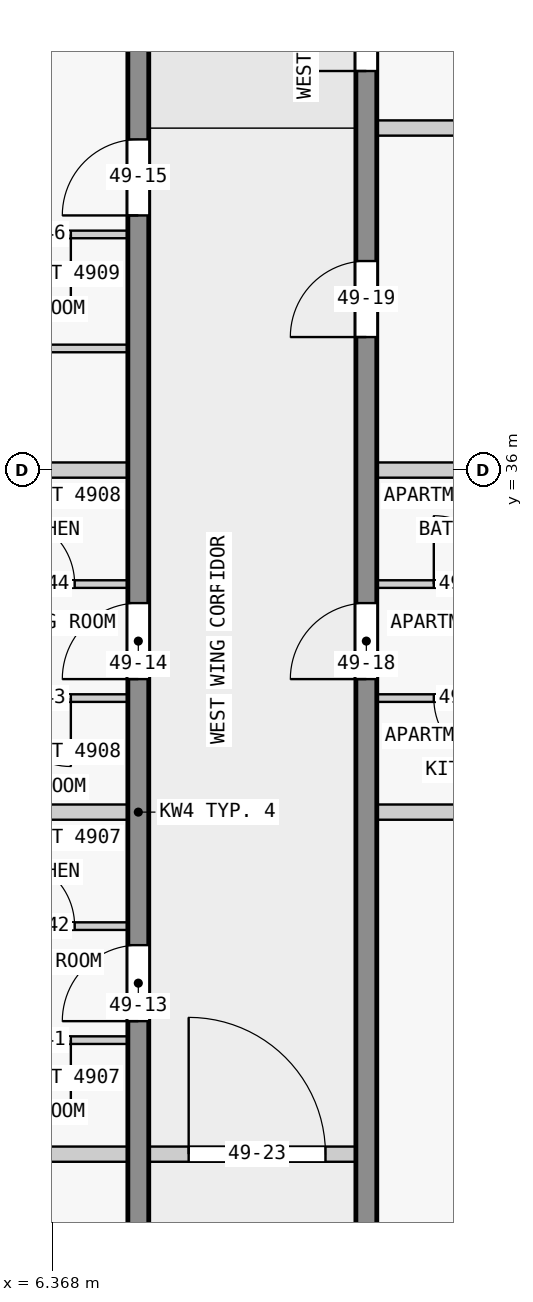
"""IFC4 building model, lengths in metres.
Left out: names, types, materials, properties, quantities, classifications, styles, units other than length and angle.
Written with IfcOpenShell. Run it as: python <this file> out.ifc"""

import sys

from ifc_helpers import new_model, si_unit, direction, frame, frame_2d, origin, place, context, subcontext, project, spatial, rectangle, extrude, element, fill, save


model = new_model("IFC4")
c1 = context("Model", 3, precision=1e-05, world=origin(), true_north=direction((0.0, 1.0)))
c2 = subcontext(c1, "Body", "Model", "MODEL_VIEW")
j1 = project(units=[si_unit("LENGTHUNIT", "METRE"), si_unit("PLANEANGLEUNIT", "RADIAN")], contexts=[c1])
p1 = place(None, origin())
s1 = spatial("IfcSite", under=j1, at=p1, CompositionType="ELEMENT")
p2 = place(p1, origin())
s2 = spatial("IfcBuilding", under=s1, at=p2, CompositionType="ELEMENT")
p3 = place(p2, frame((0.0, 0.0, 190.9)))
s3 = spatial("IfcBuildingStorey", under=s2, at=p3, CompositionType="ELEMENT", Elevation=190.9)
p4 = place(p3, frame((7.5, 18.0, 0.0), z_axis=(0.0, 0.0, 1.0), x_axis=(0.0, 1.0, 0.0)))
e1 = element("IfcWall", 1, at=p4, inside=s3, PredefinedType="SHEAR", context=c2, shape_type="SweptSolid", body=[
    extrude(rectangle(XDim=27.0, YDim=0.275, at=frame_2d((13.5, 0.0))), origin(), (0.0, 0.0, 1.0), 3.25),
])
p5 = place(p4, frame((1.75, 0.0, 0.0)))
e2 = element("IfcOpeningElement", 2, at=p5, cuts=e1, PredefinedType="OPENING", context=c2, shape_type="SweptSolid", body=[
    extrude(rectangle(XDim=1.0, YDim=2.1, at=frame_2d((0.5, 1.05))), frame((0.0, 0.147, 0.0), z_axis=(0.0, -1.0, 0.0), x_axis=(1.0, 0.0, 0.0)), (0.0, 0.0, 1.0), 0.295),
])
p6 = place(p4, frame((5.85, 0.0, 0.0)))
e3 = element("IfcOpeningElement", 3, at=p6, cuts=e1, PredefinedType="OPENING", context=c2, shape_type="SweptSolid", body=[
    extrude(rectangle(XDim=1.8, YDim=2.1, at=frame_2d((0.9, 1.05))), frame((0.0, 0.147, 0.0), z_axis=(0.0, -1.0, 0.0), x_axis=(1.0, 0.0, 0.0)), (0.0, 0.0, 1.0), 0.295),
])
p7 = place(p4, frame((10.75, 0.0, 0.0)))
e4 = element("IfcOpeningElement", 4, at=p7, cuts=e1, PredefinedType="OPENING", context=c2, shape_type="SweptSolid", body=[
    extrude(rectangle(XDim=1.0, YDim=2.1, at=frame_2d((0.5, 1.05))), frame((0.0, 0.147, 0.0), z_axis=(0.0, -1.0, 0.0), x_axis=(1.0, 0.0, 0.0)), (0.0, 0.0, 1.0), 0.295),
])
p8 = place(p4, frame((15.25, 0.0, 0.0)))
e5 = element("IfcOpeningElement", 5, at=p8, cuts=e1, PredefinedType="OPENING", context=c2, shape_type="SweptSolid", body=[
    extrude(rectangle(XDim=1.0, YDim=2.1, at=frame_2d((0.5, 1.05))), frame((0.0, 0.147, 0.0), z_axis=(0.0, -1.0, 0.0), x_axis=(1.0, 0.0, 0.0)), (0.0, 0.0, 1.0), 0.295),
])
p9 = place(p4, frame((21.35, 0.0, 0.0)))
e6 = element("IfcOpeningElement", 6, at=p9, cuts=e1, PredefinedType="OPENING", context=c2, shape_type="SweptSolid", body=[
    extrude(rectangle(XDim=1.0, YDim=2.1, at=frame_2d((0.5, 1.05))), frame((0.0, 0.147, 0.0), z_axis=(0.0, -1.0, 0.0), x_axis=(1.0, 0.0, 0.0)), (0.0, 0.0, 1.0), 0.295),
])
p10 = place(p3, frame((10.5, 18.0, 0.0), z_axis=(0.0, 0.0, 1.0), x_axis=(0.0, 1.0, 0.0)))
e7 = element("IfcWall", 7, at=p10, inside=s3, PredefinedType="SHEAR", context=c2, shape_type="SweptSolid", body=[
    extrude(rectangle(XDim=27.0, YDim=0.275, at=frame_2d((13.5, 0.0))), origin(), (0.0, 0.0, 1.0), 3.25),
])
p11 = place(p10, frame((1.75, 0.0, 0.0)))
e8 = element("IfcOpeningElement", 8, at=p11, cuts=e7, PredefinedType="OPENING", context=c2, shape_type="SweptSolid", body=[
    extrude(rectangle(XDim=1.0, YDim=2.1, at=frame_2d((0.5, 1.05))), frame((0.0, 0.147, 0.0), z_axis=(0.0, -1.0, 0.0), x_axis=(1.0, 0.0, 0.0)), (0.0, 0.0, 1.0), 0.295),
])
p12 = place(p10, frame((6.25, 0.0, 0.0)))
e9 = element("IfcOpeningElement", 9, at=p12, cuts=e7, PredefinedType="OPENING", context=c2, shape_type="SweptSolid", body=[
    extrude(rectangle(XDim=1.0, YDim=2.1, at=frame_2d((0.5, 1.05))), frame((0.0, 0.147, 0.0), z_axis=(0.0, -1.0, 0.0), x_axis=(1.0, 0.0, 0.0)), (0.0, 0.0, 1.0), 0.295),
])
p13 = place(p10, frame((15.25, 0.0, 0.0)))
e10 = element("IfcOpeningElement", 10, at=p13, cuts=e7, PredefinedType="OPENING", context=c2, shape_type="SweptSolid", body=[
    extrude(rectangle(XDim=1.0, YDim=2.1, at=frame_2d((0.5, 1.05))), frame((0.0, 0.147, 0.0), z_axis=(0.0, -1.0, 0.0), x_axis=(1.0, 0.0, 0.0)), (0.0, 0.0, 1.0), 0.295),
])
p14 = place(p10, frame((19.75, 0.0, 0.0)))
e11 = element("IfcOpeningElement", 11, at=p14, cuts=e7, PredefinedType="OPENING", context=c2, shape_type="SweptSolid", body=[
    extrude(rectangle(XDim=1.0, YDim=2.1, at=frame_2d((0.5, 1.05))), frame((0.0, 0.147, 0.0), z_axis=(0.0, -1.0, 0.0), x_axis=(1.0, 0.0, 0.0)), (0.0, 0.0, 1.0), 0.295),
])
p15 = place(p10, frame((23.25, 0.0, 0.0)))
e12 = element("IfcOpeningElement", 12, at=p15, cuts=e7, PredefinedType="OPENING", context=c2, shape_type="SweptSolid", body=[
    extrude(rectangle(XDim=0.9, YDim=2.1, at=frame_2d((0.45, 1.05))), frame((0.0, 0.147, 0.0), z_axis=(0.0, -1.0, 0.0), x_axis=(1.0, 0.0, 0.0)), (0.0, 0.0, 1.0), 0.295),
])
p16 = place(p10, frame((25.45, 0.0, 0.0)))
e13 = element("IfcOpeningElement", 13, at=p16, cuts=e7, PredefinedType="OPENING", context=c2, shape_type="SweptSolid", body=[
    extrude(rectangle(XDim=1.0, YDim=2.1, at=frame_2d((0.5, 1.05))), frame((0.0, 0.147, 0.0), z_axis=(0.0, -1.0, 0.0), x_axis=(1.0, 0.0, 0.0)), (0.0, 0.0, 1.0), 0.295),
])
p17 = place(p3, frame((7.363, 27.0, 0.0), z_axis=(0.0, 0.0, 1.0), x_axis=(-1.0, 0.0, 0.0)))
e14 = element("IfcWall", 14, at=p17, inside=s3, PredefinedType="PARTITIONING", context=c2, shape_type="SweptSolid", body=[
    extrude(rectangle(XDim=7.443, YDim=0.2, at=frame_2d((3.721, 0.0))), origin(), (0.0, 0.0, 1.0), 3.25),
])
p18 = place(p3, frame((7.363, 28.5, 0.0), z_axis=(0.0, 0.0, 1.0), x_axis=(-1.0, 0.0, 0.0)))
e15 = element("IfcWall", 15, at=p18, inside=s3, PredefinedType="PARTITIONING", context=c2, shape_type="SweptSolid", body=[
    extrude(rectangle(XDim=2.4, YDim=0.1, at=frame_2d((1.2, 0.0))), origin(), (0.0, 0.0, 1.0), 3.25),
])
p19 = place(p18, frame((0.75, 0.0, 0.0)))
e16 = element("IfcOpeningElement", 16, at=p19, cuts=e15, PredefinedType="OPENING", context=c2, shape_type="SweptSolid", body=[
    extrude(rectangle(XDim=0.9, YDim=2.1, at=frame_2d((0.45, 1.05))), frame((0.0, 0.06, 0.0), z_axis=(0.0, -1.0, 0.0), x_axis=(1.0, 0.0, 0.0)), (0.0, 0.0, 1.0), 0.12),
])
p20 = place(p3, frame((5.012, 30.0, 0.0), z_axis=(0.0, 0.0, 1.0), x_axis=(1.0, 0.0, 0.0)))
e17 = element("IfcWall", 17, at=p20, inside=s3, PredefinedType="PARTITIONING", context=c2, shape_type="SweptSolid", body=[
    extrude(rectangle(XDim=2.35, YDim=0.1, at=frame_2d((1.175, 0.0))), origin(), (0.0, 0.0, 1.0), 3.25),
])
p21 = place(p20, frame((0.75, 0.0, 0.0)))
e18 = element("IfcOpeningElement", 18, at=p21, cuts=e17, PredefinedType="OPENING", context=c2, shape_type="SweptSolid", body=[
    extrude(rectangle(XDim=0.9, YDim=2.1, at=frame_2d((0.45, 1.05))), frame((0.0, 0.06, 0.0), z_axis=(0.0, -1.0, 0.0), x_axis=(1.0, 0.0, 0.0)), (0.0, 0.0, 1.0), 0.12),
])
p22 = place(p3, frame((7.363, 31.5, 0.0), z_axis=(0.0, 0.0, 1.0), x_axis=(-1.0, 0.0, 0.0)))
e19 = element("IfcWall", 19, at=p22, inside=s3, PredefinedType="PARTITIONING", context=c2, shape_type="SweptSolid", body=[
    extrude(rectangle(XDim=2.3, YDim=0.2, at=frame_2d((1.15, 0.0))), origin(), (0.0, 0.0, 1.0), 3.25),
])
p23 = place(p3, frame((17.85, 31.5, 0.0), z_axis=(0.0, 0.0, 1.0), x_axis=(-1.0, 0.0, 0.0)))
e20 = element("IfcWall", 20, at=p23, inside=s3, PredefinedType="PARTITIONING", context=c2, shape_type="SweptSolid", body=[
    extrude(rectangle(XDim=7.213, YDim=0.2, at=frame_2d((3.606, 0.0))), origin(), (0.0, 0.0, 1.0), 3.25),
])
p24 = place(p3, frame((7.363, 33.0, 0.0), z_axis=(0.0, 0.0, 1.0), x_axis=(-1.0, 0.0, 0.0)))
e21 = element("IfcWall", 21, at=p24, inside=s3, PredefinedType="PARTITIONING", context=c2, shape_type="SweptSolid", body=[
    extrude(rectangle(XDim=2.35, YDim=0.1, at=frame_2d((1.175, 0.0))), origin(), (0.0, 0.0, 1.0), 3.25),
])
p25 = place(p24, frame((0.75, 0.0, 0.0)))
e22 = element("IfcOpeningElement", 22, at=p25, cuts=e21, PredefinedType="OPENING", context=c2, shape_type="SweptSolid", body=[
    extrude(rectangle(XDim=0.9, YDim=2.1, at=frame_2d((0.45, 1.05))), frame((0.0, 0.06, 0.0), z_axis=(0.0, -1.0, 0.0), x_axis=(1.0, 0.0, 0.0)), (0.0, 0.0, 1.0), 0.12),
])
p26 = place(p3, frame((13.038, 33.0, 0.0), z_axis=(0.0, 0.0, 1.0), x_axis=(-1.0, 0.0, 0.0)))
e23 = element("IfcWall", 23, at=p26, inside=s3, PredefinedType="PARTITIONING", context=c2, shape_type="SweptSolid", body=[
    extrude(rectangle(XDim=2.4, YDim=0.1, at=frame_2d((1.2, 0.0))), origin(), (0.0, 0.0, 1.0), 3.25),
])
p27 = place(p26, frame((0.75, 0.0, 0.0)))
e24 = element("IfcOpeningElement", 24, at=p27, cuts=e23, PredefinedType="OPENING", context=c2, shape_type="SweptSolid", body=[
    extrude(rectangle(XDim=0.9, YDim=2.1, at=frame_2d((0.45, 1.05))), frame((0.0, 0.06, 0.0), z_axis=(0.0, -1.0, 0.0), x_axis=(1.0, 0.0, 0.0)), (0.0, 0.0, 1.0), 0.12),
])
p28 = place(p3, frame((5.012, 34.5, 0.0), z_axis=(0.0, 0.0, 1.0), x_axis=(1.0, 0.0, 0.0)))
e25 = element("IfcWall", 25, at=p28, inside=s3, PredefinedType="PARTITIONING", context=c2, shape_type="SweptSolid", body=[
    extrude(rectangle(XDim=2.35, YDim=0.1, at=frame_2d((1.175, 0.0))), origin(), (0.0, 0.0, 1.0), 3.25),
])
p29 = place(p28, frame((0.75, 0.0, 0.0)))
e26 = element("IfcOpeningElement", 26, at=p29, cuts=e25, PredefinedType="OPENING", context=c2, shape_type="SweptSolid", body=[
    extrude(rectangle(XDim=0.9, YDim=2.1, at=frame_2d((0.45, 1.05))), frame((0.0, 0.06, 0.0), z_axis=(0.0, -1.0, 0.0), x_axis=(1.0, 0.0, 0.0)), (0.0, 0.0, 1.0), 0.12),
])
p30 = place(p3, frame((10.637, 34.5, 0.0), z_axis=(0.0, 0.0, 1.0), x_axis=(1.0, 0.0, 0.0)))
e27 = element("IfcWall", 27, at=p30, inside=s3, PredefinedType="PARTITIONING", context=c2, shape_type="SweptSolid", body=[
    extrude(rectangle(XDim=2.4, YDim=0.1, at=frame_2d((1.2, 0.0))), origin(), (0.0, 0.0, 1.0), 3.25),
])
p31 = place(p30, frame((0.75, 0.0, 0.0)))
e28 = element("IfcOpeningElement", 28, at=p31, cuts=e27, PredefinedType="OPENING", context=c2, shape_type="SweptSolid", body=[
    extrude(rectangle(XDim=0.9, YDim=2.1, at=frame_2d((0.45, 1.05))), frame((0.0, 0.06, 0.0), z_axis=(0.0, -1.0, 0.0), x_axis=(1.0, 0.0, 0.0)), (0.0, 0.0, 1.0), 0.12),
])
for number, where, z_axis, x_axis in (
    (29, (7.363, 36.0, 0.0), (0.0, 0.0, 1.0), (-1.0, 0.0, 0.0)),
    (30, (12.938, 36.0, 0.0), (0.0, 0.0, 1.0), (-1.0, 0.0, 0.0)),
):
    element("IfcWall", number, at=place(p3, frame(where, z_axis=z_axis, x_axis=x_axis)), inside=s3, PredefinedType="PARTITIONING", context=c2, shape_type="SweptSolid", body=[
        extrude(rectangle(XDim=2.3, YDim=0.2, at=frame_2d((1.15, 0.0))), origin(), (0.0, 0.0, 1.0), 3.25),
    ])
p32 = place(p3, frame((7.363, 37.6, 0.0), z_axis=(0.0, 0.0, 1.0), x_axis=(-1.0, 0.0, 0.0)))
e31 = element("IfcWall", 31, at=p32, inside=s3, PredefinedType="PARTITIONING", context=c2, shape_type="SweptSolid", body=[
    extrude(rectangle(XDim=2.35, YDim=0.1, at=frame_2d((1.175, 0.0))), origin(), (0.0, 0.0, 1.0), 3.25),
])
p33 = place(p3, frame((7.363, 39.1, 0.0), z_axis=(0.0, 0.0, 1.0), x_axis=(-1.0, 0.0, 0.0)))
e32 = element("IfcWall", 32, at=p33, inside=s3, PredefinedType="PARTITIONING", context=c2, shape_type="SweptSolid", body=[
    extrude(rectangle(XDim=2.35, YDim=0.1, at=frame_2d((1.175, 0.0))), origin(), (0.0, 0.0, 1.0), 3.25),
])
p34 = place(p33, frame((0.75, 0.0, 0.0)))
e33 = element("IfcOpeningElement", 33, at=p34, cuts=e32, PredefinedType="OPENING", context=c2, shape_type="SweptSolid", body=[
    extrude(rectangle(XDim=0.9, YDim=2.1, at=frame_2d((0.45, 1.05))), frame((0.0, 0.06, 0.0), z_axis=(0.0, -1.0, 0.0), x_axis=(1.0, 0.0, 0.0)), (0.0, 0.0, 1.0), 0.12),
])
p35 = place(p3, frame((18.08, 40.5, 0.0), z_axis=(0.0, 0.0, 1.0), x_axis=(-1.0, 0.0, 0.0)))
e34 = element("IfcWall", 34, at=p35, inside=s3, PredefinedType="PARTITIONING", context=c2, shape_type="SweptSolid", body=[
    extrude(rectangle(XDim=7.443, YDim=0.2, at=frame_2d((3.721, 0.0))), origin(), (0.0, 0.0, 1.0), 3.25),
])
p36 = place(p3, frame((7.462, 27.0, 0.0), z_axis=(0.0, 0.0, 1.0), x_axis=(1.0, 0.0, 0.0)))
e35 = element("IfcWall", 35, at=p36, inside=s3, PredefinedType="PARTITIONING", context=c2, shape_type="SweptSolid", body=[
    extrude(rectangle(XDim=3.175, YDim=0.2, at=frame_2d((1.587, 0.0))), origin(), (0.0, 0.0, 1.0), 3.25),
])
p37 = place(p36, frame((0.7, 0.0, 0.0)))
e36 = element("IfcOpeningElement", 36, at=p37, cuts=e35, PredefinedType="OPENING", context=c2, shape_type="SweptSolid", body=[
    extrude(rectangle(XDim=1.8, YDim=2.1, at=frame_2d((0.9, 1.05))), frame((0.0, 0.11, 0.0), z_axis=(0.0, -1.0, 0.0), x_axis=(1.0, 0.0, 0.0)), (0.0, 0.0, 1.0), 0.22),
])
p38 = place(p7, origin())
e37 = element("IfcDoor", 37, at=p38, inside=s3, OperationType="SINGLE_SWING_LEFT", PredefinedType="DOOR", context=c2, shape_type="SweptSolid", body=[
    extrude(rectangle(XDim=1.0, YDim=2.1, at=frame_2d((0.5, 1.05))), frame((0.0, 0.025, 0.0), z_axis=(0.0, -1.0, 0.0), x_axis=(1.0, 0.0, 0.0)), (0.0, 0.0, 1.0), 0.05),
])
fill(e4, e37)
p39 = place(p8, origin())
e38 = element("IfcDoor", 38, at=p39, inside=s3, OperationType="SINGLE_SWING_RIGHT", PredefinedType="DOOR", context=c2, shape_type="SweptSolid", body=[
    extrude(rectangle(XDim=1.0, YDim=2.1, at=frame_2d((0.5, 1.05))), frame((0.0, 0.025, 0.0), z_axis=(0.0, -1.0, 0.0), x_axis=(1.0, 0.0, 0.0)), (0.0, 0.0, 1.0), 0.05),
])
fill(e5, e38)
p40 = place(p9, origin())
e39 = element("IfcDoor", 39, at=p40, inside=s3, OperationType="SINGLE_SWING_RIGHT", PredefinedType="DOOR", context=c2, shape_type="SweptSolid", body=[
    extrude(rectangle(XDim=1.0, YDim=2.1, at=frame_2d((0.5, 1.05))), frame((0.0, 0.025, 0.0), z_axis=(0.0, -1.0, 0.0), x_axis=(1.0, 0.0, 0.0)), (0.0, 0.0, 1.0), 0.05),
])
fill(e6, e39)
p41 = place(p13, origin())
e40 = element("IfcDoor", 40, at=p41, inside=s3, OperationType="SINGLE_SWING_RIGHT", PredefinedType="DOOR", context=c2, shape_type="SweptSolid", body=[
    extrude(rectangle(XDim=1.0, YDim=2.1, at=frame_2d((0.5, 1.05))), frame((0.0, 0.025, 0.0), z_axis=(0.0, -1.0, 0.0), x_axis=(1.0, 0.0, 0.0)), (0.0, 0.0, 1.0), 0.05),
])
fill(e10, e40)
p42 = place(p14, origin())
e41 = element("IfcDoor", 41, at=p42, inside=s3, OperationType="SINGLE_SWING_RIGHT", PredefinedType="DOOR", context=c2, shape_type="SweptSolid", body=[
    extrude(rectangle(XDim=1.0, YDim=2.1, at=frame_2d((0.5, 1.05))), frame((0.0, 0.025, 0.0), z_axis=(0.0, -1.0, 0.0), x_axis=(1.0, 0.0, 0.0)), (0.0, 0.0, 1.0), 0.05),
])
fill(e11, e41)
p43 = place(p15, origin())
e42 = element("IfcDoor", 42, at=p43, inside=s3, OperationType="SINGLE_SWING_RIGHT", PredefinedType="DOOR", context=c2, shape_type="SweptSolid", body=[
    extrude(rectangle(XDim=0.9, YDim=2.1, at=frame_2d((0.45, 1.05))), frame((0.0, 0.025, 0.0), z_axis=(0.0, -1.0, 0.0), x_axis=(1.0, 0.0, 0.0)), (0.0, 0.0, 1.0), 0.05),
])
fill(e12, e42)
p44 = place(p37, origin())
e43 = element("IfcDoor", 43, at=p44, inside=s3, OperationType="SINGLE_SWING_RIGHT", PredefinedType="DOOR", context=c2, shape_type="SweptSolid", body=[
    extrude(rectangle(XDim=1.8, YDim=2.1, at=frame_2d((0.9, 1.05))), frame((0.0, 0.025, 0.0), z_axis=(0.0, -1.0, 0.0), x_axis=(1.0, 0.0, 0.0)), (0.0, 0.0, 1.0), 0.05),
])
fill(e36, e43)
p45 = place(p19, origin())
e44 = element("IfcDoor", 44, at=p45, inside=s3, OperationType="SINGLE_SWING_RIGHT", PredefinedType="DOOR", context=c2, shape_type="SweptSolid", body=[
    extrude(rectangle(XDim=0.9, YDim=2.1, at=frame_2d((0.45, 1.05))), frame((0.0, 0.025, 0.0), z_axis=(0.0, -1.0, 0.0), x_axis=(1.0, 0.0, 0.0)), (0.0, 0.0, 1.0), 0.05),
])
fill(e16, e44)
p46 = place(p21, origin())
e45 = element("IfcDoor", 45, at=p46, inside=s3, OperationType="SINGLE_SWING_RIGHT", PredefinedType="DOOR", context=c2, shape_type="SweptSolid", body=[
    extrude(rectangle(XDim=0.9, YDim=2.1, at=frame_2d((0.45, 1.05))), frame((0.0, 0.025, 0.0), z_axis=(0.0, -1.0, 0.0), x_axis=(1.0, 0.0, 0.0)), (0.0, 0.0, 1.0), 0.05),
])
fill(e18, e45)
p47 = place(p25, origin())
e46 = element("IfcDoor", 46, at=p47, inside=s3, OperationType="SINGLE_SWING_RIGHT", PredefinedType="DOOR", context=c2, shape_type="SweptSolid", body=[
    extrude(rectangle(XDim=0.9, YDim=2.1, at=frame_2d((0.45, 1.05))), frame((0.0, 0.025, 0.0), z_axis=(0.0, -1.0, 0.0), x_axis=(1.0, 0.0, 0.0)), (0.0, 0.0, 1.0), 0.05),
])
fill(e22, e46)
p48 = place(p29, origin())
e47 = element("IfcDoor", 47, at=p48, inside=s3, OperationType="SINGLE_SWING_RIGHT", PredefinedType="DOOR", context=c2, shape_type="SweptSolid", body=[
    extrude(rectangle(XDim=0.9, YDim=2.1, at=frame_2d((0.45, 1.05))), frame((0.0, 0.025, 0.0), z_axis=(0.0, -1.0, 0.0), x_axis=(1.0, 0.0, 0.0)), (0.0, 0.0, 1.0), 0.05),
])
fill(e26, e47)
p49 = place(p34, origin())
e48 = element("IfcDoor", 48, at=p49, inside=s3, OperationType="SINGLE_SWING_RIGHT", PredefinedType="DOOR", context=c2, shape_type="SweptSolid", body=[
    extrude(rectangle(XDim=0.9, YDim=2.1, at=frame_2d((0.45, 1.05))), frame((0.0, 0.025, 0.0), z_axis=(0.0, -1.0, 0.0), x_axis=(1.0, 0.0, 0.0)), (0.0, 0.0, 1.0), 0.05),
])
fill(e33, e48)
p50 = place(p27, origin())
e49 = element("IfcDoor", 49, at=p50, inside=s3, OperationType="SINGLE_SWING_LEFT", PredefinedType="DOOR", context=c2, shape_type="SweptSolid", body=[
    extrude(rectangle(XDim=0.9, YDim=2.1, at=frame_2d((0.45, 1.05))), frame((0.0, 0.025, 0.0), z_axis=(0.0, -1.0, 0.0), x_axis=(1.0, 0.0, 0.0)), (0.0, 0.0, 1.0), 0.05),
])
fill(e24, e49)
p51 = place(p31, origin())
e50 = element("IfcDoor", 50, at=p51, inside=s3, OperationType="SINGLE_SWING_LEFT", PredefinedType="DOOR", context=c2, shape_type="SweptSolid", body=[
    extrude(rectangle(XDim=0.9, YDim=2.1, at=frame_2d((0.45, 1.05))), frame((0.0, 0.025, 0.0), z_axis=(0.0, -1.0, 0.0), x_axis=(1.0, 0.0, 0.0)), (0.0, 0.0, 1.0), 0.05),
])
fill(e28, e50)
save(model, sys.argv[1])
